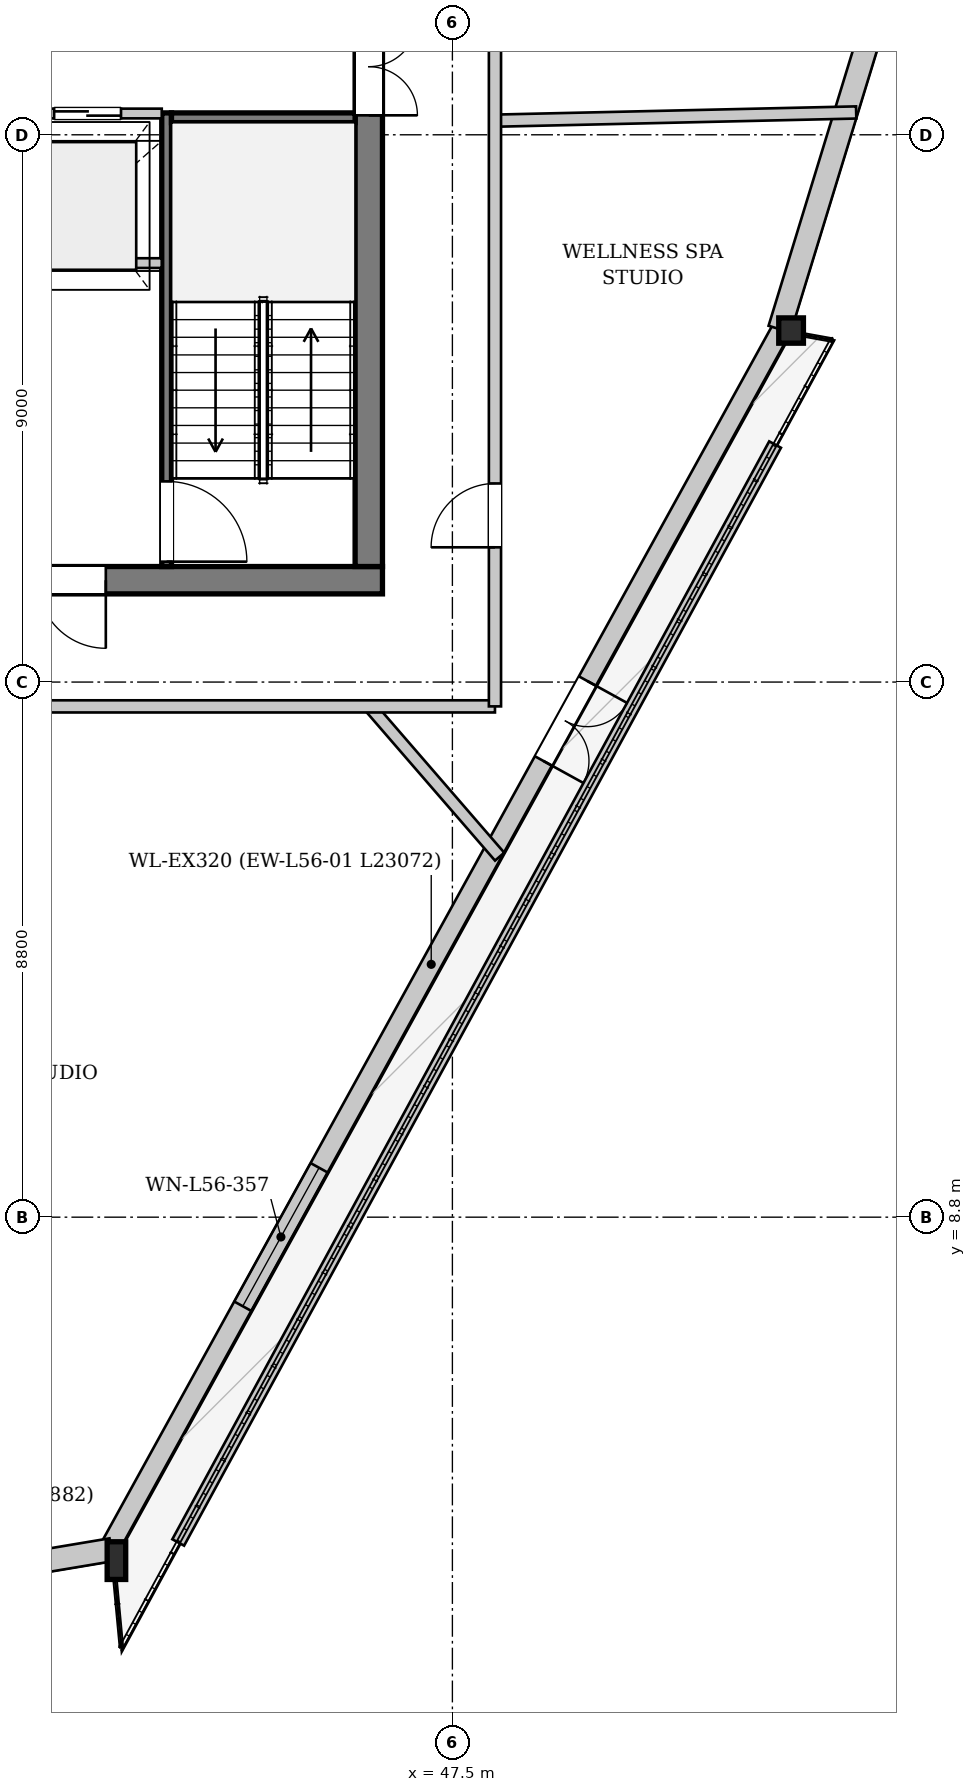
"""IFC4 building model, lengths in metres.
Left out: names, types, materials, properties, quantities, classifications, styles, units other than length and angle.
Written with IfcOpenShell. Run it as: python <this file> out.ifc"""

import sys

from ifc_helpers import new_model, si_unit, direction, frame, frame_2d, origin, origin_2d, place, context, subcontext, project, spatial, rectangle, i_section, extrude, source, transform, mapped, element, fill, save


model = new_model("IFC4")
c1 = context("Model", 3, precision=1e-05, world=origin(), true_north=direction((0.0, 1.0)))
c2 = subcontext(c1, "Body", "Model", "MODEL_VIEW")
j1 = project(units=[si_unit("LENGTHUNIT", "METRE"), si_unit("PLANEANGLEUNIT", "RADIAN")], contexts=[c1])
p1 = place(None, origin())
s1 = spatial("IfcSite", under=j1, at=p1, CompositionType="ELEMENT")
p2 = place(p1, origin())
s2 = spatial("IfcBuilding", under=s1, at=p2, CompositionType="ELEMENT")
p3 = place(p2, frame((0.0, 0.0, 213.15)))
s3 = spatial("IfcBuildingStorey", under=s2, at=p3, CompositionType="ELEMENT", Elevation=213.15)
m1 = source(origin(), c2, "Body", "SweptSolid", [
    extrude(i_section(OverallWidth=0.305, OverallDepth=0.62, WebThickness=0.021, FlangeThickness=0.04, at=origin_2d()), origin(), (0.0, 0.0, 1.0), 3.387),
])
p4 = place(p3, frame((41.923, 3.143, 0.0), z_axis=(0.030205792979, 0.005118404061, 0.999530595835), x_axis=(-0.167069460816, 0.985945127917, 0.0)))
e1 = element("IfcColumn", 1, at=p4, inside=s3, PredefinedType="COLUMN", context=c2, shape_type="MappedRepresentation", body=[
    mapped(m1, transform((0.0, 0.0, 0.0), x_axis=(1.0, 0.0, 0.0), y_axis=(0.0, 1.0, 0.0), z_axis=(0.0, 0.0, 1.0), scale=1.0)),
])
m2 = source(origin(), c2, "Body", "SweptSolid", [
    extrude(i_section(OverallWidth=0.406, OverallDepth=0.416, WebThickness=0.027, FlangeThickness=0.042, at=origin_2d()), origin(), (0.0, 0.0, 1.0), 3.386),
])
p5 = place(p3, frame((53.063, 23.348, 0.0), z_axis=(0.004182365572, 0.019469632835, 0.999801700946), x_axis=(-0.977696305652, 0.210023650844, 0.0)))
e2 = element("IfcColumn", 2, at=p5, inside=s3, PredefinedType="COLUMN", context=c2, shape_type="MappedRepresentation", body=[
    mapped(m2, transform((0.0, 0.0, 0.0), x_axis=(1.0, 0.0, 0.0), y_axis=(0.0, 1.0, 0.0), z_axis=(0.0, 0.0, 1.0), scale=1.0)),
])
p6 = place(p3, frame((52.923, 23.425, 0.0), z_axis=(0.0, 0.0, 1.0), x_axis=(-0.482829200204, -0.875714544489, 0.0)))
e3 = element("IfcWall", 3, at=p6, inside=s3, PredefinedType="SOLIDWALL", context=c2, shape_type="SweptSolid", body=[
    extrude(rectangle(XDim=23.072, YDim=0.32, at=frame_2d((11.536, 0.0))), origin(), (0.0, 0.0, 1.0), 2.822),
])
p7 = place(p6, frame((6.633, 0.0, 0.0)))
e4 = element("IfcOpeningElement", 4, at=p7, cuts=e3, PredefinedType="OPENING", context=c2, shape_type="SweptSolid", body=[
    extrude(rectangle(XDim=1.5, YDim=2.3, at=frame_2d((0.75, 1.15))), frame((0.0, 0.17, 0.0), z_axis=(0.0, -1.0, 0.0), x_axis=(1.0, 0.0, 0.0)), (0.0, 0.0, 1.0), 0.34),
])
p8 = place(p6, frame((15.773, 0.0, 0.352)))
e5 = element("IfcOpeningElement", 5, at=p8, cuts=e3, PredefinedType="OPENING", context=c2, shape_type="SweptSolid", body=[
    extrude(rectangle(XDim=2.6, YDim=2.35, at=frame_2d((1.3, 1.175))), frame((0.0, 0.17, 0.0), z_axis=(0.0, -1.0, 0.0), x_axis=(1.0, 0.0, 0.0)), (0.0, 0.0, 1.0), 0.34),
])
p9 = place(p3, frame((41.892, 3.331, 0.0), z_axis=(0.0, 0.0, 1.0), x_axis=(-0.986279808066, -0.165082222545, 0.0)))
e6 = element("IfcWall", 6, at=p9, inside=s3, PredefinedType="SOLIDWALL", context=c2, shape_type="SweptSolid", body=[
    extrude(rectangle(XDim=3.882, YDim=0.38, at=frame_2d((1.941, 0.0))), origin(), (0.0, 0.0, 1.0), 2.822),
])
p10 = place(p3, frame((59.639, 45.464, 0.0), z_axis=(0.0, 0.0, 1.0), x_axis=(-0.292879532816, -0.95614934987, 0.0)))
e7 = element("IfcWall", 7, at=p10, inside=s3, PredefinedType="SOLIDWALL", context=c2, shape_type="SweptSolid", body=[
    extrude(rectangle(XDim=23.072, YDim=0.38, at=frame_2d((11.536, 0.0))), origin(), (0.0, 0.0, 1.0), 2.822),
])
p11 = place(p10, frame((5.36, 0.0, 0.452)))
e8 = element("IfcOpeningElement", 8, at=p11, cuts=e7, PredefinedType="OPENING", context=c2, shape_type="SweptSolid", body=[
    extrude(rectangle(XDim=2.2, YDim=2.25, at=frame_2d((1.1, 1.125))), frame((0.0, 0.2, 0.0), z_axis=(0.0, -1.0, 0.0), x_axis=(1.0, 0.0, 0.0)), (0.0, 0.0, 1.0), 0.4),
])
p12 = place(p10, frame((15.512, 0.0, 0.452)))
e9 = element("IfcOpeningElement", 9, at=p12, cuts=e7, PredefinedType="OPENING", context=c2, shape_type="SweptSolid", body=[
    extrude(rectangle(XDim=2.2, YDim=2.25, at=frame_2d((1.1, 1.125))), frame((0.0, 0.2, 0.0), z_axis=(0.0, -1.0, 0.0), x_axis=(1.0, 0.0, 0.0)), (0.0, 0.0, 1.0), 0.4),
])
p13 = place(p3, frame((42.991, 3.451, 0.0), z_axis=(0.0, 0.0, 1.0), x_axis=(0.477647289854, 0.878551686866, 0.0)))
e10 = element("IfcWall", 10, at=p13, inside=s3, PredefinedType="PARAPET", context=c2, shape_type="SweptSolid", body=[
    extrude(rectangle(XDim=20.551, YDim=0.22, at=frame_2d((10.275, 0.0))), origin(), (0.0, 0.0, 1.0), 0.3),
])
p14 = place(p3, frame((46.35, 19.275, 0.0), z_axis=(0.0, 0.0, 1.0), x_axis=(-1.0, 0.0, 0.0)))
e11 = element("IfcWall", 11, at=p14, inside=s3, PredefinedType="SHEAR", context=c2, shape_type="SweptSolid", body=[
    extrude(rectangle(XDim=16.7, YDim=0.45, at=frame_2d((8.35, 0.0))), origin(), (0.0, 0.0, 1.0), 3.33),
])
p15 = place(p14, frame((4.55, 0.0, 0.0)))
e12 = element("IfcOpeningElement", 12, at=p15, cuts=e11, PredefinedType="OPENING", context=c2, shape_type="SweptSolid", body=[
    extrude(rectangle(XDim=1.12, YDim=2.25, at=frame_2d((0.56, 1.125))), frame((0.0, 0.235, 0.0), z_axis=(0.0, -1.0, 0.0), x_axis=(1.0, 0.0, 0.0)), (0.0, 0.0, 1.0), 0.47),
])
p16 = place(p14, frame((11.05, 0.0, 0.0)))
e13 = element("IfcOpeningElement", 13, at=p16, cuts=e11, PredefinedType="OPENING", context=c2, shape_type="SweptSolid", body=[
    extrude(rectangle(XDim=1.12, YDim=2.25, at=frame_2d((0.56, 1.125))), frame((0.0, 0.235, 0.0), z_axis=(0.0, -1.0, 0.0), x_axis=(1.0, 0.0, 0.0)), (0.0, 0.0, 1.0), 0.47),
])
p17 = place(p3, frame((46.125, 33.7, 0.0), z_axis=(0.0, 0.0, 1.0), x_axis=(0.0, -1.0, 0.0)))
e14 = element("IfcWall", 14, at=p17, inside=s3, PredefinedType="SHEAR", context=c2, shape_type="SweptSolid", body=[
    extrude(rectangle(XDim=14.2, YDim=0.45, at=frame_2d((7.1, 0.0))), origin(), (0.0, 0.0, 1.0), 3.33),
])
p18 = place(p17, frame((5.18, 0.0, 0.0)))
e15 = element("IfcOpeningElement", 15, at=p18, cuts=e14, PredefinedType="OPENING", context=c2, shape_type="SweptSolid", body=[
    extrude(rectangle(XDim=1.6, YDim=2.2, at=frame_2d((0.8, 1.1))), frame((0.0, 0.235, 0.0), z_axis=(0.0, -1.0, 0.0), x_axis=(1.0, 0.0, 0.0)), (0.0, 0.0, 1.0), 0.47),
])
p19 = place(p17, frame((2.05, 0.0, 0.0)))
e16 = element("IfcOpeningElement", 16, at=p19, cuts=e14, PredefinedType="OPENING", context=c2, shape_type="SweptSolid", body=[
    extrude(rectangle(XDim=0.95, YDim=2.1, at=frame_2d((0.475, 1.05))), frame((0.0, 0.235, 0.0), z_axis=(0.0, -1.0, 0.0), x_axis=(1.0, 0.0, 0.0)), (0.0, 0.0, 1.0), 0.47),
])
p20 = place(p3, frame((42.8, 26.96, 0.0), z_axis=(0.0, 0.0, 1.0), x_axis=(0.0, -1.0, 0.0)))
e17 = element("IfcWall", 17, at=p20, inside=s3, PredefinedType="PARTITIONING", context=c2, shape_type="SweptSolid", body=[
    extrude(rectangle(XDim=7.46, YDim=0.16, at=frame_2d((3.73, 0.0))), origin(), (0.0, 0.0, 1.0), 3.33),
])
p21 = place(p20, frame((6.06, 0.0, 0.0)))
e18 = element("IfcOpeningElement", 18, at=p21, cuts=e17, PredefinedType="OPENING", context=c2, shape_type="SweptSolid", body=[
    extrude(rectangle(XDim=1.32, YDim=2.2, at=frame_2d((0.66, 1.1))), frame((0.0, 0.09, 0.0), z_axis=(0.0, -1.0, 0.0), x_axis=(1.0, 0.0, 0.0)), (0.0, 0.0, 1.0), 0.18),
])
p22 = place(p3, frame((42.88, 26.88, 0.0), z_axis=(0.0, 0.0, 1.0), x_axis=(1.0, 0.0, 0.0)))
e19 = element("IfcWall", 19, at=p22, inside=s3, PredefinedType="PARTITIONING", context=c2, shape_type="SweptSolid", body=[
    extrude(rectangle(XDim=3.02, YDim=0.16, at=frame_2d((1.51, 0.0))), origin(), (0.0, 0.0, 1.0), 3.33),
])
p23 = place(p3, frame((33.28, 24.49, 0.0), z_axis=(0.0, 0.0, 1.0), x_axis=(1.0, 0.0, 0.0)))
e20 = element("IfcWall", 20, at=p23, inside=s3, PredefinedType="PARTITIONING", context=c2, shape_type="SweptSolid", body=[
    extrude(rectangle(XDim=9.44, YDim=0.16, at=frame_2d((4.72, 0.0))), origin(), (0.0, 0.0, 1.0), 3.33),
])
p24 = place(p3, frame((33.28, 26.95, 0.0), z_axis=(0.0, 0.0, 1.0), x_axis=(1.0, 0.0, 0.0)))
e21 = element("IfcWall", 21, at=p24, inside=s3, PredefinedType="PARTITIONING", context=c2, shape_type="SweptSolid", body=[
    extrude(rectangle(XDim=9.44, YDim=0.16, at=frame_2d((4.72, 0.0))), origin(), (0.0, 0.0, 1.0), 3.33),
])
p25 = place(p24, frame((1.2, 0.0, 0.0)))
e22 = element("IfcOpeningElement", 22, at=p25, cuts=e21, PredefinedType="OPENING", context=c2, shape_type="SweptSolid", body=[
    extrude(rectangle(XDim=0.95, YDim=2.1, at=frame_2d((0.475, 1.05))), frame((0.0, 0.09, 0.0), z_axis=(0.0, -1.0, 0.0), x_axis=(1.0, 0.0, 0.0)), (0.0, 0.0, 1.0), 0.18),
])
p26 = place(p24, frame((4.65, 0.0, 0.0)))
e23 = element("IfcOpeningElement", 23, at=p26, cuts=e21, PredefinedType="OPENING", context=c2, shape_type="SweptSolid", body=[
    extrude(rectangle(XDim=0.95, YDim=2.1, at=frame_2d((0.475, 1.05))), frame((0.0, 0.09, 0.0), z_axis=(0.0, -1.0, 0.0), x_axis=(1.0, 0.0, 0.0)), (0.0, 0.0, 1.0), 0.18),
])
p27 = place(p24, frame((7.67, 0.0, 0.0)))
e24 = element("IfcOpeningElement", 24, at=p27, cuts=e21, PredefinedType="OPENING", context=c2, shape_type="SweptSolid", body=[
    extrude(rectangle(XDim=1.1, YDim=2.2, at=frame_2d((0.55, 1.1))), frame((0.0, 0.09, 0.0), z_axis=(0.0, -1.0, 0.0), x_axis=(1.0, 0.0, 0.0)), (0.0, 0.0, 1.0), 0.18),
])
p28 = place(p3, frame((46.138, 17.2, 0.0), z_axis=(0.0, 0.0, 1.0), x_axis=(0.654523763177, -0.756041429709, 0.0)))
e25 = element("IfcWall", 25, at=p28, inside=s3, PredefinedType="PARTITIONING", context=c2, shape_type="SweptSolid", body=[
    extrude(rectangle(XDim=3.268, YDim=0.2, at=frame_2d((1.634, 0.0))), origin(), (0.0, 0.0, 1.0), 3.33),
])
p29 = place(p3, frame((48.2, 26.832, 0.0), z_axis=(0.0, 0.0, 1.0), x_axis=(0.999740922664, 0.022761536644, 0.0)))
e26 = element("IfcWall", 26, at=p29, inside=s3, PredefinedType="PARTITIONING", context=c2, shape_type="SweptSolid", body=[
    extrude(rectangle(XDim=5.942, YDim=0.2, at=frame_2d((2.971, 0.0))), origin(), (0.0, 0.0, 1.0), 3.33),
])
p30 = place(p3, frame((27.8, 17.2, 0.0), z_axis=(0.0, 0.0, 1.0), x_axis=(1.0, 0.0, 0.0)))
e27 = element("IfcWall", 27, at=p30, inside=s3, PredefinedType="PARTITIONING", context=c2, shape_type="SweptSolid", body=[
    extrude(rectangle(XDim=20.4, YDim=0.2, at=frame_2d((10.2, 0.0))), origin(), (0.0, 0.0, 1.0), 3.33),
])
p31 = place(p30, frame((1.186, 0.0, 0.0)))
e28 = element("IfcOpeningElement", 28, at=p31, cuts=e27, PredefinedType="OPENING", context=c2, shape_type="SweptSolid", body=[
    extrude(rectangle(XDim=1.05, YDim=2.2, at=frame_2d((0.525, 1.1))), frame((0.0, 0.11, 0.0), z_axis=(0.0, -1.0, 0.0), x_axis=(1.0, 0.0, 0.0)), (0.0, 0.0, 1.0), 0.22),
])
p32 = place(p30, frame((11.634, 0.0, 0.0)))
e29 = element("IfcOpeningElement", 29, at=p32, cuts=e27, PredefinedType="OPENING", context=c2, shape_type="SweptSolid", body=[
    extrude(rectangle(XDim=1.05, YDim=2.2, at=frame_2d((0.525, 1.1))), frame((0.0, 0.11, 0.0), z_axis=(0.0, -1.0, 0.0), x_axis=(1.0, 0.0, 0.0)), (0.0, 0.0, 1.0), 0.22),
])
p33 = place(p3, frame((48.2, 17.2, 0.0), z_axis=(0.0, 0.0, 1.0), x_axis=(0.0, 1.0, 0.0)))
e30 = element("IfcWall", 30, at=p33, inside=s3, PredefinedType="PARTITIONING", context=c2, shape_type="SweptSolid", body=[
    extrude(rectangle(XDim=18.8, YDim=0.2, at=frame_2d((9.4, 0.0))), origin(), (0.0, 0.0, 1.0), 3.33),
])
p34 = place(p33, frame((2.616, 0.0, 0.0)))
e31 = element("IfcOpeningElement", 31, at=p34, cuts=e30, PredefinedType="OPENING", context=c2, shape_type="SweptSolid", body=[
    extrude(rectangle(XDim=1.05, YDim=2.2, at=frame_2d((0.525, 1.1))), frame((0.0, 0.11, 0.0), z_axis=(0.0, -1.0, 0.0), x_axis=(1.0, 0.0, 0.0)), (0.0, 0.0, 1.0), 0.22),
])
p35 = place(p33, frame((17.45, 0.0, 0.0)))
e32 = element("IfcOpeningElement", 32, at=p35, cuts=e30, PredefinedType="OPENING", context=c2, shape_type="SweptSolid", body=[
    extrude(rectangle(XDim=1.05, YDim=2.2, at=frame_2d((0.525, 1.1))), frame((0.0, 0.11, 0.0), z_axis=(0.0, -1.0, 0.0), x_axis=(1.0, 0.0, 0.0)), (0.0, 0.0, 1.0), 0.22),
])
m3 = source(origin(), c2, "Body", "SweptSolid", [
    extrude(rectangle(XDim=1.5, YDim=2.3, at=frame_2d((0.75, 1.15))), frame((0.0, 0.025, 0.0), z_axis=(0.0, -1.0, 0.0), x_axis=(1.0, 0.0, 0.0)), (0.0, 0.0, 1.0), 0.05),
])
p36 = place(p7, origin())
e33 = element("IfcDoor", 33, at=p36, inside=s3, OperationType="DOUBLE_DOOR_SINGLE_SWING", PredefinedType="DOOR", context=c2, shape_type="MappedRepresentation", body=[
    mapped(m3, transform((0.0, 0.0, 0.0), x_axis=(1.0, 0.0, 0.0), y_axis=(0.0, 1.0, 0.0), z_axis=(0.0, 0.0, 1.0), scale=1.0)),
])
fill(e4, e33)
m4 = source(origin(), c2, "Body", "SweptSolid", [
    extrude(rectangle(XDim=2.6, YDim=2.35, at=frame_2d((1.3, 1.175))), frame((0.0, 0.03, 0.0), z_axis=(0.0, -1.0, 0.0), x_axis=(1.0, 0.0, 0.0)), (0.0, 0.0, 1.0), 0.06),
])
p37 = place(p8, origin())
e34 = element("IfcWindow", 34, at=p37, inside=s3, PartitioningType="SINGLE_PANEL", PredefinedType="WINDOW", context=c2, shape_type="MappedRepresentation", body=[
    mapped(m4, transform((0.0, 0.0, 0.0), x_axis=(1.0, 0.0, 0.0), y_axis=(0.0, 1.0, 0.0), z_axis=(0.0, 0.0, 1.0), scale=1.0)),
])
fill(e5, e34)
m5 = source(origin(), c2, "Body", "SweptSolid", [
    extrude(rectangle(XDim=1.12, YDim=2.25, at=frame_2d((0.56, 1.125))), frame((0.0, 0.025, 0.0), z_axis=(0.0, -1.0, 0.0), x_axis=(1.0, 0.0, 0.0)), (0.0, 0.0, 1.0), 0.05),
])
p38 = place(p15, origin())
e35 = element("IfcDoor", 35, at=p38, inside=s3, OperationType="SINGLE_SWING_LEFT", PredefinedType="DOOR", context=c2, shape_type="MappedRepresentation", body=[
    mapped(m5, transform((0.0, 0.0, 0.0), x_axis=(1.0, 0.0, 0.0), y_axis=(0.0, 1.0, 0.0), z_axis=(0.0, 0.0, 1.0), scale=1.0)),
])
fill(e12, e35)
m6 = source(origin(), c2, "Body", "SweptSolid", [
    extrude(rectangle(XDim=1.6, YDim=2.2, at=frame_2d((0.8, 1.1))), frame((0.0, 0.025, 0.0), z_axis=(0.0, -1.0, 0.0), x_axis=(1.0, 0.0, 0.0)), (0.0, 0.0, 1.0), 0.05),
])
p39 = place(p18, origin())
e36 = element("IfcDoor", 36, at=p39, inside=s3, OperationType="DOUBLE_DOOR_SINGLE_SWING", PredefinedType="DOOR", context=c2, shape_type="MappedRepresentation", body=[
    mapped(m6, transform((0.0, 0.0, 0.0), x_axis=(1.0, 0.0, 0.0), y_axis=(0.0, 1.0, 0.0), z_axis=(0.0, 0.0, 1.0), scale=1.0)),
])
fill(e15, e36)
m7 = source(origin(), c2, "Body", "SweptSolid", [
    extrude(rectangle(XDim=1.32, YDim=2.2, at=frame_2d((0.66, 1.1))), frame((0.0, 0.025, 0.0), z_axis=(0.0, -1.0, 0.0), x_axis=(1.0, 0.0, 0.0)), (0.0, 0.0, 1.0), 0.05),
])
p40 = place(p21, origin())
e37 = element("IfcDoor", 37, at=p40, inside=s3, OperationType="SINGLE_SWING_RIGHT", PredefinedType="DOOR", context=c2, shape_type="MappedRepresentation", body=[
    mapped(m7, transform((0.0, 0.0, 0.0), x_axis=(1.0, 0.0, 0.0), y_axis=(0.0, 1.0, 0.0), z_axis=(0.0, 0.0, 1.0), scale=1.0)),
])
fill(e18, e37)
m8 = source(origin(), c2, "Body", "SweptSolid", [
    extrude(rectangle(XDim=1.1, YDim=2.2, at=frame_2d((0.55, 1.1))), frame((0.0, 0.025, 0.0), z_axis=(0.0, -1.0, 0.0), x_axis=(1.0, 0.0, 0.0)), (0.0, 0.0, 1.0), 0.05),
])
p41 = place(p27, origin())
e38 = element("IfcDoor", 38, at=p41, inside=s3, OperationType="DOUBLE_DOOR_SLIDING", PredefinedType="DOOR", context=c2, shape_type="MappedRepresentation", body=[
    mapped(m8, transform((0.0, 0.0, 0.0), x_axis=(1.0, 0.0, 0.0), y_axis=(0.0, 1.0, 0.0), z_axis=(0.0, 0.0, 1.0), scale=1.0)),
])
fill(e24, e38)
m9 = source(origin(), c2, "Body", "SweptSolid", [
    extrude(rectangle(XDim=1.05, YDim=2.2, at=frame_2d((0.525, 1.1))), frame((0.0, 0.025, 0.0), z_axis=(0.0, -1.0, 0.0), x_axis=(1.0, 0.0, 0.0)), (0.0, 0.0, 1.0), 0.05),
])
p42 = place(p34, origin())
e39 = element("IfcDoor", 39, at=p42, inside=s3, OperationType="SINGLE_SWING_LEFT", PredefinedType="DOOR", context=c2, shape_type="MappedRepresentation", body=[
    mapped(m9, transform((0.0, 0.0, 0.0), x_axis=(1.0, 0.0, 0.0), y_axis=(0.0, 1.0, 0.0), z_axis=(0.0, 0.0, 1.0), scale=1.0)),
])
fill(e31, e39)
save(model, sys.argv[1])
